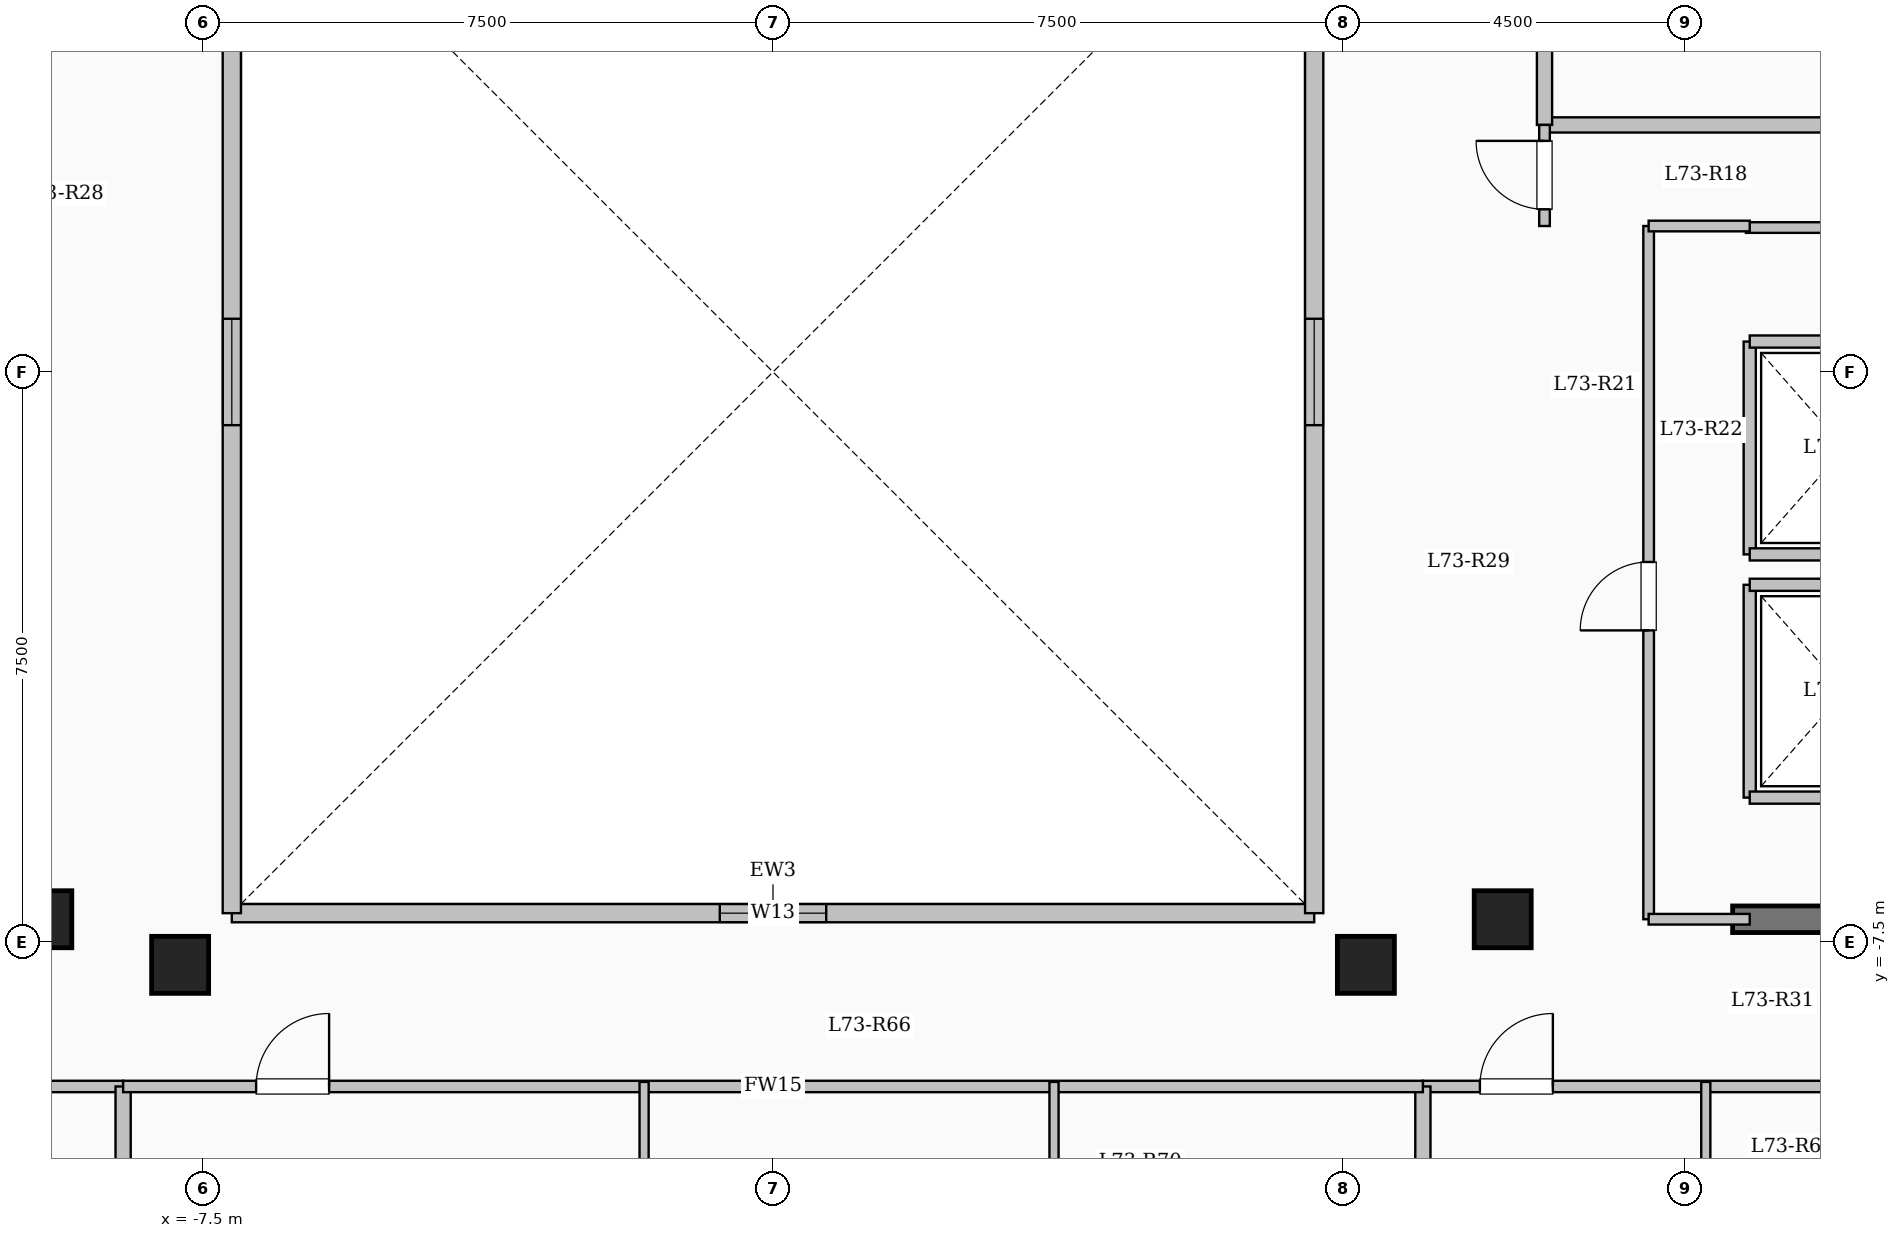
"""IFC4 building model, lengths in metres.
Left out: names, types, materials, properties, quantities, classifications, styles, units other than length and angle.
Written with IfcOpenShell. Run it as: python <this file> out.ifc"""

import sys

from ifc_helpers import new_model, si_unit, direction, frame, frame_2d, origin, origin_2d, place, context, subcontext, project, spatial, rectangle, extrude, element, fill, save


model = new_model("IFC4")
c1 = context("Model", 3, precision=1e-05, world=origin(), true_north=direction((0.0, 1.0)))
c2 = subcontext(c1, "Body", "Model", "MODEL_VIEW")
j1 = project(units=[si_unit("LENGTHUNIT", "METRE"), si_unit("PLANEANGLEUNIT", "RADIAN")], contexts=[c1])
p1 = place(None, origin())
s1 = spatial("IfcSite", under=j1, at=p1, CompositionType="ELEMENT")
p2 = place(p1, origin())
s2 = spatial("IfcBuilding", under=s1, at=p2, CompositionType="ELEMENT")
p3 = place(p2, frame((0.0, 0.0, 268.3)))
s3 = spatial("IfcBuildingStorey", under=s2, at=p3, CompositionType="ELEMENT", Elevation=268.3)
for number, where, z_axis, x_axis in (
    (1, (-7.8, -7.8, 0.0), (0.0, 0.0, 1.0), (1.0, 0.0, 0.0)),
    (2, (7.8, -7.8, 0.0), (0.0, 0.0, 1.0), (1.0, 0.0, 0.0)),
    (3, (-9.6, -7.2, 0.0), (0.0, 0.0, 1.0), (1.0, 0.0, 0.0)),
    (4, (9.6, -7.2, 0.0), (0.0, 0.0, 1.0), (1.0, 0.0, 0.0)),
):
    element("IfcColumn", number, at=place(p3, frame(where, z_axis=z_axis, x_axis=x_axis)), inside=s3, PredefinedType="COLUMN", context=c2, shape_type="SweptSolid", body=[
        extrude(rectangle(XDim=0.75, YDim=0.75, at=origin_2d()), origin(), (0.0, 0.0, 1.0), 3.35),
    ])
p4 = place(p3, frame((-7.12, -7.12, 0.0), z_axis=(0.0, 0.0, 1.0), x_axis=(1.0, 0.0, 0.0)))
e5 = element("IfcWall", 5, at=p4, inside=s3, PredefinedType="SOLIDWALL", context=c2, shape_type="SweptSolid", body=[
    extrude(rectangle(XDim=14.24, YDim=0.24, at=frame_2d((7.12, 0.0))), origin(), (0.0, 0.0, 1.0), 3.05),
])
p5 = place(p4, frame((6.42, 0.0, 0.95)))
e6 = element("IfcOpeningElement", 6, at=p5, cuts=e5, PredefinedType="OPENING", context=c2, shape_type="SweptSolid", body=[
    extrude(rectangle(XDim=1.4, YDim=1.5, at=frame_2d((0.7, 0.75))), frame((0.0, 0.13, 0.0), z_axis=(0.0, -1.0, 0.0), x_axis=(1.0, 0.0, 0.0)), (0.0, 0.0, 1.0), 0.26),
])
p6 = place(p3, frame((7.12, -7.12, 0.0), z_axis=(0.0, 0.0, 1.0), x_axis=(0.0, 1.0, 0.0)))
e7 = element("IfcWall", 7, at=p6, inside=s3, PredefinedType="SOLIDWALL", context=c2, shape_type="SweptSolid", body=[
    extrude(rectangle(XDim=14.24, YDim=0.24, at=frame_2d((7.12, 0.0))), origin(), (0.0, 0.0, 1.0), 3.05),
])
p7 = place(p6, frame((6.42, 0.0, 0.95)))
e8 = element("IfcOpeningElement", 8, at=p7, cuts=e7, PredefinedType="OPENING", context=c2, shape_type="SweptSolid", body=[
    extrude(rectangle(XDim=1.4, YDim=1.5, at=frame_2d((0.7, 0.75))), frame((0.0, 0.13, 0.0), z_axis=(0.0, -1.0, 0.0), x_axis=(1.0, 0.0, 0.0)), (0.0, 0.0, 1.0), 0.26),
])
p8 = place(p3, frame((-7.12, 7.12, 0.0), z_axis=(0.0, 0.0, 1.0), x_axis=(0.0, -1.0, 0.0)))
e9 = element("IfcWall", 9, at=p8, inside=s3, PredefinedType="SOLIDWALL", context=c2, shape_type="SweptSolid", body=[
    extrude(rectangle(XDim=14.24, YDim=0.24, at=frame_2d((7.12, 0.0))), origin(), (0.0, 0.0, 1.0), 3.05),
])
p9 = place(p8, frame((6.42, 0.0, 0.95)))
e10 = element("IfcOpeningElement", 10, at=p9, cuts=e9, PredefinedType="OPENING", context=c2, shape_type="SweptSolid", body=[
    extrude(rectangle(XDim=1.4, YDim=1.5, at=frame_2d((0.7, 0.75))), frame((0.0, 0.13, 0.0), z_axis=(0.0, -1.0, 0.0), x_axis=(1.0, 0.0, 0.0)), (0.0, 0.0, 1.0), 0.26),
])
p10 = place(p3, frame((10.15, 3.25, 0.0), z_axis=(0.0, 0.0, 1.0), x_axis=(1.0, 0.0, 0.0)))
e11 = element("IfcWall", 11, at=p10, inside=s3, PredefinedType="SOLIDWALL", context=c2, shape_type="SweptSolid", body=[
    extrude(rectangle(XDim=5.4, YDim=0.2, at=frame_2d((2.7, 0.0))), origin(), (0.0, 0.0, 1.0), 3.05),
])
p11 = place(p3, frame((10.15, 3.25, 0.0), z_axis=(0.0, 0.0, 1.0), x_axis=(0.0, 1.0, 0.0)))
e12 = element("IfcWall", 12, at=p11, inside=s3, PredefinedType="SOLIDWALL", context=c2, shape_type="SweptSolid", body=[
    extrude(rectangle(XDim=3.25, YDim=0.2, at=frame_2d((1.625, 0.0))), origin(), (0.0, 0.0, 1.0), 3.05),
])
p12 = place(p11, frame((1.1, 0.0, 0.0)))
e13 = element("IfcOpeningElement", 13, at=p12, cuts=e12, PredefinedType="OPENING", context=c2, shape_type="SweptSolid", body=[
    extrude(rectangle(XDim=1.02, YDim=2.15, at=frame_2d((0.51, 1.075))), frame((0.0, 0.11, 0.0), z_axis=(0.0, -1.0, 0.0), x_axis=(1.0, 0.0, 0.0)), (0.0, 0.0, 1.0), 0.22),
])
p13 = place(p3, frame((12.85, -5.6, 0.0), z_axis=(0.0, 0.0, 1.0), x_axis=(0.0, 1.0, 0.0)))
e14 = element("IfcWall", 14, at=p13, inside=s3, PredefinedType="SOLIDWALL", context=c2, shape_type="SweptSolid", body=[
    extrude(rectangle(XDim=2.8, YDim=0.16, at=frame_2d((1.4, 0.0))), origin(), (0.0, 0.0, 1.0), 3.05),
])
for number, where, z_axis, x_axis in (
    (15, (12.85, -5.6, 0.0), (0.0, 0.0, 1.0), (1.0, 0.0, 0.0)),
    (16, (12.85, -2.8, 0.0), (0.0, 0.0, 1.0), (1.0, 0.0, 0.0)),
):
    element("IfcWall", number, at=place(p3, frame(where, z_axis=z_axis, x_axis=x_axis)), inside=s3, PredefinedType="SOLIDWALL", context=c2, shape_type="SweptSolid", body=[
        extrude(rectangle(XDim=2.5, YDim=0.16, at=frame_2d((1.25, 0.0))), origin(), (0.0, 0.0, 1.0), 3.05),
    ])
p14 = place(p3, frame((12.85, -2.4, 0.0), z_axis=(0.0, 0.0, 1.0), x_axis=(0.0, 1.0, 0.0)))
e17 = element("IfcWall", 17, at=p14, inside=s3, PredefinedType="SOLIDWALL", context=c2, shape_type="SweptSolid", body=[
    extrude(rectangle(XDim=2.8, YDim=0.16, at=frame_2d((1.4, 0.0))), origin(), (0.0, 0.0, 1.0), 3.05),
])
for number, where, z_axis, x_axis in (
    (18, (12.85, -2.4, 0.0), (0.0, 0.0, 1.0), (1.0, 0.0, 0.0)),
    (19, (12.85, 0.4, 0.0), (0.0, 0.0, 1.0), (1.0, 0.0, 0.0)),
):
    element("IfcWall", number, at=place(p3, frame(where, z_axis=z_axis, x_axis=x_axis)), inside=s3, PredefinedType="SOLIDWALL", context=c2, shape_type="SweptSolid", body=[
        extrude(rectangle(XDim=2.5, YDim=0.16, at=frame_2d((1.25, 0.0))), origin(), (0.0, 0.0, 1.0), 3.05),
    ])
p15 = place(p3, frame((12.625, -7.2, 0.0), z_axis=(0.0, 0.0, 1.0), x_axis=(1.0, 0.0, 0.0)))
e20 = element("IfcWall", 20, at=p15, inside=s3, PredefinedType="SHEAR", context=c2, shape_type="SweptSolid", body=[
    extrude(rectangle(XDim=6.0, YDim=0.35, at=frame_2d((3.0, 0.0))), origin(), (0.0, 0.0, 1.0), 3.35),
])
p16 = place(p3, frame((12.8, 1.9, 0.0), z_axis=(0.0, 0.0, 1.0), x_axis=(1.0, 0.0, 0.0)))
e21 = element("IfcWall", 21, at=p16, inside=s3, PredefinedType="PARTITIONING", context=c2, shape_type="SweptSolid", body=[
    extrude(rectangle(XDim=2.6, YDim=0.14, at=frame_2d((1.3, 0.0))), origin(), (0.0, 0.0, 1.0), 3.05),
])
p17 = place(p3, frame((10.15, 1.92, 0.0), z_axis=(0.0, 0.0, 1.0), x_axis=(0.0, 1.0, 0.0)))
e22 = element("IfcWall", 22, at=p17, inside=s3, PredefinedType="PARTITIONING", context=c2, shape_type="SweptSolid", body=[
    extrude(rectangle(XDim=1.33, YDim=0.14, at=frame_2d((0.665, 0.0))), origin(), (0.0, 0.0, 1.0), 3.05),
])
p18 = place(p17, frame((0.22, 0.0, 0.0)))
e23 = element("IfcOpeningElement", 23, at=p18, cuts=e22, PredefinedType="OPENING", context=c2, shape_type="SweptSolid", body=[
    extrude(rectangle(XDim=0.9, YDim=2.08, at=frame_2d((0.45, 1.04))), frame((0.0, 0.08, 0.0), z_axis=(0.0, -1.0, 0.0), x_axis=(1.0, 0.0, 0.0)), (0.0, 0.0, 1.0), 0.16),
])
p19 = place(p3, frame((11.52, -7.2, 0.0), z_axis=(0.0, 0.0, 1.0), x_axis=(0.0, 1.0, 0.0)))
e24 = element("IfcWall", 24, at=p19, inside=s3, PredefinedType="PARTITIONING", context=c2, shape_type="SweptSolid", body=[
    extrude(rectangle(XDim=9.12, YDim=0.14, at=frame_2d((4.56, 0.0))), origin(), (0.0, 0.0, 1.0), 3.05),
])
p20 = place(p19, frame((3.8, 0.0, 0.0)))
e25 = element("IfcOpeningElement", 25, at=p20, cuts=e24, PredefinedType="OPENING", context=c2, shape_type="SweptSolid", body=[
    extrude(rectangle(XDim=0.9, YDim=2.08, at=frame_2d((0.45, 1.04))), frame((0.0, 0.08, 0.0), z_axis=(0.0, -1.0, 0.0), x_axis=(1.0, 0.0, 0.0)), (0.0, 0.0, 1.0), 0.16),
])
p21 = place(p3, frame((11.52, 1.92, 0.0), z_axis=(0.0, 0.0, 1.0), x_axis=(1.0, 0.0, 0.0)))
e26 = element("IfcWall", 26, at=p21, inside=s3, PredefinedType="PARTITIONING", context=c2, shape_type="SweptSolid", body=[
    extrude(rectangle(XDim=1.33, YDim=0.14, at=frame_2d((0.665, 0.0))), origin(), (0.0, 0.0, 1.0), 3.05),
])
p22 = place(p3, frame((11.52, -7.2, 0.0), z_axis=(0.0, 0.0, 1.0), x_axis=(1.0, 0.0, 0.0)))
e27 = element("IfcWall", 27, at=p22, inside=s3, PredefinedType="PARTITIONING", context=c2, shape_type="SweptSolid", body=[
    extrude(rectangle(XDim=1.33, YDim=0.14, at=frame_2d((0.665, 0.0))), origin(), (0.0, 0.0, 1.0), 2.22),
])
p23 = place(p3, frame((-17.75, -9.4, 0.0), z_axis=(0.0, 0.0, 1.0), x_axis=(1.0, 0.0, 0.0)))
e28 = element("IfcWall", 28, at=p23, inside=s3, PredefinedType="PARTITIONING", context=c2, shape_type="SweptSolid", body=[
    extrude(rectangle(XDim=9.2, YDim=0.15, at=frame_2d((4.6, 0.0))), origin(), (0.0, 0.0, 1.0), 3.05),
])
p24 = place(p23, frame((0.7, 0.0, 0.0)))
e29 = element("IfcOpeningElement", 29, at=p24, cuts=e28, PredefinedType="OPENING", context=c2, shape_type="SweptSolid", body=[
    extrude(rectangle(XDim=0.96, YDim=2.15, at=frame_2d((0.48, 1.075))), frame((0.0, 0.085, 0.0), z_axis=(0.0, -1.0, 0.0), x_axis=(1.0, 0.0, 0.0)), (0.0, 0.0, 1.0), 0.17),
])
p25 = place(p3, frame((8.55, -9.4, 0.0), z_axis=(0.0, 0.0, 1.0), x_axis=(1.0, 0.0, 0.0)))
e30 = element("IfcWall", 30, at=p25, inside=s3, PredefinedType="PARTITIONING", context=c2, shape_type="SweptSolid", body=[
    extrude(rectangle(XDim=9.2, YDim=0.15, at=frame_2d((4.6, 0.0))), origin(), (0.0, 0.0, 1.0), 3.05),
])
p26 = place(p25, frame((0.75, 0.0, 0.0)))
e31 = element("IfcOpeningElement", 31, at=p26, cuts=e30, PredefinedType="OPENING", context=c2, shape_type="SweptSolid", body=[
    extrude(rectangle(XDim=0.96, YDim=2.15, at=frame_2d((0.48, 1.075))), frame((0.0, 0.085, 0.0), z_axis=(0.0, -1.0, 0.0), x_axis=(1.0, 0.0, 0.0)), (0.0, 0.0, 1.0), 0.17),
])
p27 = place(p3, frame((12.272, -20.9, 0.0), z_axis=(0.0, 0.0, 1.0), x_axis=(0.0, 1.0, 0.0)))
e32 = element("IfcWall", 32, at=p27, inside=s3, PredefinedType="PARTITIONING", context=c2, shape_type="SweptSolid", body=[
    extrude(rectangle(XDim=11.56, YDim=0.12, at=frame_2d((5.78, 0.0))), origin(), (0.0, 0.0, 1.0), 3.05),
])
p28 = place(p27, frame((7.395, 0.0, 0.0)))
e33 = element("IfcOpeningElement", 33, at=p28, cuts=e32, PredefinedType="OPENING", context=c2, shape_type="SweptSolid", body=[
    extrude(rectangle(XDim=1.08, YDim=2.15, at=frame_2d((0.54, 1.075))), frame((0.0, 0.07, 0.0), z_axis=(0.0, -1.0, 0.0), x_axis=(1.0, 0.0, 0.0)), (0.0, 0.0, 1.0), 0.14),
])
for number, where, z_axis, x_axis in (
    (34, (-8.55, -21.504, 0.0), (0.0, 0.0, 1.0), (0.0, 1.0, 0.0)),
    (35, (8.55, -21.504, 0.0), (0.0, 0.0, 1.0), (0.0, 1.0, 0.0)),
):
    element("IfcWall", number, at=place(p3, frame(where, z_axis=z_axis, x_axis=x_axis)), inside=s3, PredefinedType="SOLIDWALL", context=c2, shape_type="SweptSolid", body=[
        extrude(rectangle(XDim=12.104, YDim=0.2, at=frame_2d((6.052, 0.0))), origin(), (0.0, 0.0, 1.0), 3.05),
    ])
p29 = place(p3, frame((-8.55, -9.4, 0.0), z_axis=(0.0, 0.0, 1.0), x_axis=(1.0, 0.0, 0.0)))
e36 = element("IfcWall", 36, at=p29, inside=s3, PredefinedType="PARTITIONING", context=c2, shape_type="SweptSolid", body=[
    extrude(rectangle(XDim=17.1, YDim=0.15, at=frame_2d((8.55, 0.0))), origin(), (0.0, 0.0, 1.0), 3.05),
])
p30 = place(p29, frame((1.75, 0.0, 0.0)))
e37 = element("IfcOpeningElement", 37, at=p30, cuts=e36, PredefinedType="OPENING", context=c2, shape_type="SweptSolid", body=[
    extrude(rectangle(XDim=0.96, YDim=2.15, at=frame_2d((0.48, 1.075))), frame((0.0, 0.085, 0.0), z_axis=(0.0, -1.0, 0.0), x_axis=(1.0, 0.0, 0.0)), (0.0, 0.0, 1.0), 0.17),
])
p31 = place(p3, frame((-1.696, -22.38, 0.0), z_axis=(0.0, 0.0, 1.0), x_axis=(0.0, 1.0, 0.0)))
e38 = element("IfcWall", 38, at=p31, inside=s3, PredefinedType="PARTITIONING", context=c2, shape_type="SweptSolid", body=[
    extrude(rectangle(XDim=13.04, YDim=0.12, at=frame_2d((6.52, 0.0))), origin(), (0.0, 0.0, 1.0), 3.05),
])
p32 = place(p31, frame((8.705, 0.0, 0.0)))
e39 = element("IfcOpeningElement", 39, at=p32, cuts=e38, PredefinedType="OPENING", context=c2, shape_type="SweptSolid", body=[
    extrude(rectangle(XDim=1.08, YDim=2.15, at=frame_2d((0.54, 1.075))), frame((0.0, 0.07, 0.0), z_axis=(0.0, -1.0, 0.0), x_axis=(1.0, 0.0, 0.0)), (0.0, 0.0, 1.0), 0.14),
])
p33 = place(p3, frame((3.697, -12.31, 0.0), z_axis=(0.0, 0.0, 1.0), x_axis=(0.0, 1.0, 0.0)))
e40 = element("IfcWall", 40, at=p33, inside=s3, PredefinedType="PARTITIONING", context=c2, shape_type="SweptSolid", body=[
    extrude(rectangle(XDim=2.97, YDim=0.12, at=frame_2d((1.485, 0.0))), origin(), (0.0, 0.0, 1.0), 3.05),
])
p34 = place(p5, origin())
e41 = element("IfcWindow", 41, at=p34, inside=s3, PartitioningType="SINGLE_PANEL", PredefinedType="WINDOW", context=c2, shape_type="SweptSolid", body=[
    extrude(rectangle(XDim=1.4, YDim=1.5, at=frame_2d((0.7, 0.75))), frame((0.0, 0.03, 0.0), z_axis=(0.0, -1.0, 0.0), x_axis=(1.0, 0.0, 0.0)), (0.0, 0.0, 1.0), 0.06),
])
fill(e6, e41)
p35 = place(p7, origin())
e42 = element("IfcWindow", 42, at=p35, inside=s3, PartitioningType="SINGLE_PANEL", PredefinedType="WINDOW", context=c2, shape_type="SweptSolid", body=[
    extrude(rectangle(XDim=1.4, YDim=1.5, at=frame_2d((0.7, 0.75))), frame((0.0, 0.03, 0.0), z_axis=(0.0, -1.0, 0.0), x_axis=(1.0, 0.0, 0.0)), (0.0, 0.0, 1.0), 0.06),
])
fill(e8, e42)
p36 = place(p9, origin())
e43 = element("IfcWindow", 43, at=p36, inside=s3, PartitioningType="SINGLE_PANEL", PredefinedType="WINDOW", context=c2, shape_type="SweptSolid", body=[
    extrude(rectangle(XDim=1.4, YDim=1.5, at=frame_2d((0.7, 0.75))), frame((0.0, 0.03, 0.0), z_axis=(0.0, -1.0, 0.0), x_axis=(1.0, 0.0, 0.0)), (0.0, 0.0, 1.0), 0.06),
])
fill(e10, e43)
p37 = place(p18, origin())
e44 = element("IfcDoor", 44, at=p37, inside=s3, OperationType="SINGLE_SWING_RIGHT", PredefinedType="DOOR", context=c2, shape_type="SweptSolid", body=[
    extrude(rectangle(XDim=0.9, YDim=2.08, at=frame_2d((0.45, 1.04))), frame((0.0, 0.025, 0.0), z_axis=(0.0, -1.0, 0.0), x_axis=(1.0, 0.0, 0.0)), (0.0, 0.0, 1.0), 0.05),
])
fill(e23, e44)
p38 = place(p20, origin())
e45 = element("IfcDoor", 45, at=p38, inside=s3, OperationType="SINGLE_SWING_LEFT", PredefinedType="DOOR", context=c2, shape_type="SweptSolid", body=[
    extrude(rectangle(XDim=0.9, YDim=2.08, at=frame_2d((0.45, 1.04))), frame((0.0, 0.025, 0.0), z_axis=(0.0, -1.0, 0.0), x_axis=(1.0, 0.0, 0.0)), (0.0, 0.0, 1.0), 0.05),
])
fill(e25, e45)
p39 = place(p26, origin())
e46 = element("IfcDoor", 46, at=p39, inside=s3, OperationType="SINGLE_SWING_RIGHT", PredefinedType="DOOR", context=c2, shape_type="SweptSolid", body=[
    extrude(rectangle(XDim=0.96, YDim=2.15, at=frame_2d((0.48, 1.075))), frame((0.0, 0.025, 0.0), z_axis=(0.0, -1.0, 0.0), x_axis=(1.0, 0.0, 0.0)), (0.0, 0.0, 1.0), 0.05),
])
fill(e31, e46)
p40 = place(p30, origin())
e47 = element("IfcDoor", 47, at=p40, inside=s3, OperationType="SINGLE_SWING_RIGHT", PredefinedType="DOOR", context=c2, shape_type="SweptSolid", body=[
    extrude(rectangle(XDim=0.96, YDim=2.15, at=frame_2d((0.48, 1.075))), frame((0.0, 0.025, 0.0), z_axis=(0.0, -1.0, 0.0), x_axis=(1.0, 0.0, 0.0)), (0.0, 0.0, 1.0), 0.05),
])
fill(e37, e47)
save(model, sys.argv[1])
